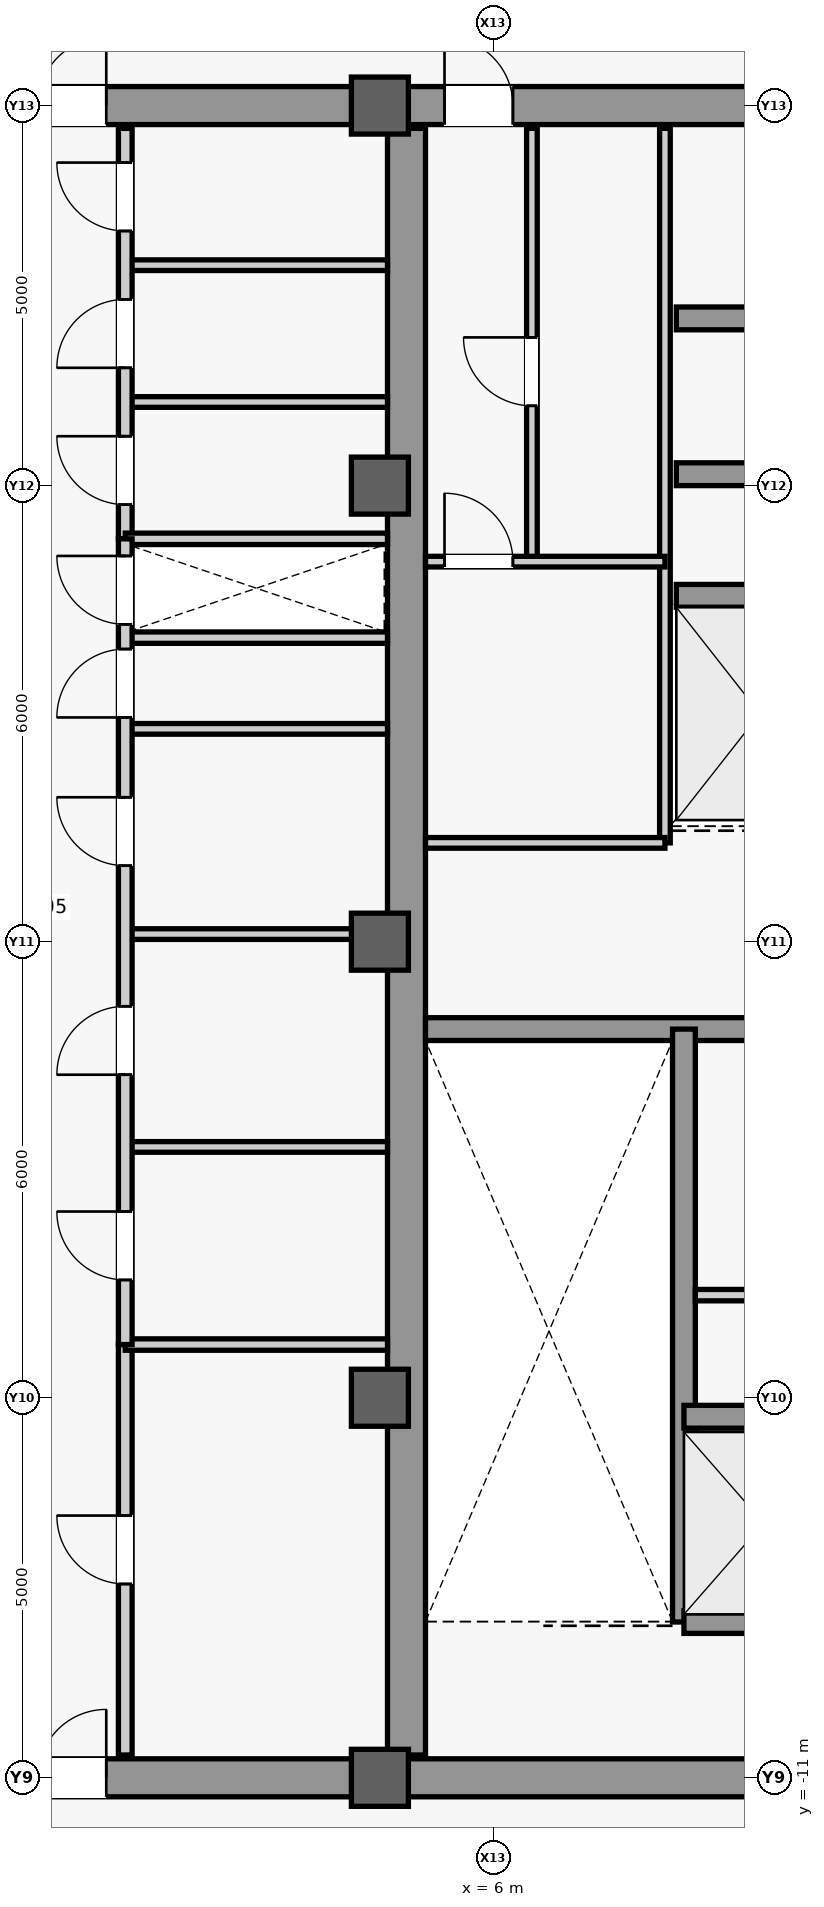
"""IFC4 building model, lengths in metres.
Left out: names, types, materials, properties, quantities, classifications, styles, units other than length and angle.
Written with IfcOpenShell. Run it as: python <this file> out.ifc"""

import sys

from ifc_helpers import new_model, si_unit, direction, frame, frame_2d, origin, origin_2d, place, context, subcontext, project, spatial, rectangle, extrude, source, transform, mapped, element, fill, save


model = new_model("IFC4")
c1 = context("Model", 3, precision=1e-05, world=origin(), true_north=direction((0.0, 1.0)))
c2 = subcontext(c1, "Body", "Model", "MODEL_VIEW")
j1 = project(units=[si_unit("LENGTHUNIT", "METRE"), si_unit("PLANEANGLEUNIT", "RADIAN")], contexts=[c1])
p1 = place(None, origin())
s1 = spatial("IfcSite", under=j1, at=p1, CompositionType="ELEMENT")
p2 = place(p1, origin())
s2 = spatial("IfcBuilding", under=s1, at=p2, CompositionType="ELEMENT")
p3 = place(p2, frame((0.0, 0.0, 399.5)))
s3 = spatial("IfcBuildingStorey", under=s2, at=p3, CompositionType="ELEMENT", Elevation=399.5)
m1 = source(origin(), c2, "Body", "SweptSolid", [
    extrude(rectangle(XDim=21.4, YDim=0.5, at=frame_2d((10.7, 0.0))), origin(), (0.0, 0.0, 1.0), 4.5),
])
p4 = place(p3, frame((4.85, -10.7, 0.0), z_axis=(0.0, 0.0, 1.0), x_axis=(0.0, 1.0, 0.0)))
e1 = element("IfcWall", 1, at=p4, inside=s3, PredefinedType="SHEAR", context=c2, shape_type="MappedRepresentation", body=[
    mapped(m1, transform((0.0, 0.0, 0.0), scale=1.0)),
])
m2 = source(origin(), c2, "Body", "SweptSolid", [
    extrude(rectangle(XDim=5.9, YDim=0.5, at=frame_2d((2.95, 0.0))), origin(), (0.0, 0.0, 1.0), 4.5),
])
p5 = place(p3, frame((4.85, -11.0, 0.0), z_axis=(0.0, 0.0, 1.0), x_axis=(1.0, 0.0, 0.0)))
e2 = element("IfcWall", 2, at=p5, inside=s3, PredefinedType="SHEAR", context=c2, shape_type="MappedRepresentation", body=[
    mapped(m2, transform((0.0, 0.0, 0.0), scale=1.0)),
])
p6 = place(p3, frame((4.85, 11.0, 0.0), z_axis=(0.0, 0.0, 1.0), x_axis=(1.0, 0.0, 0.0)))
e3 = element("IfcWall", 3, at=p6, inside=s3, PredefinedType="SHEAR", context=c2, shape_type="MappedRepresentation", body=[
    mapped(m2, transform((0.0, 0.0, 0.0), scale=1.0)),
])
m3 = source(origin(), c2, "Body", "SweptSolid", [
    extrude(rectangle(XDim=0.9, YDim=2.15, at=frame_2d((0.45, 1.075))), frame((0.0, 0.26, 0.0), z_axis=(0.0, -1.0, 0.0), x_axis=(1.0, 0.0, 0.0)), (0.0, 0.0, 1.0), 0.52),
])
p7 = place(p6, frame((0.5, 0.0, 0.0)))
e4 = element("IfcOpeningElement", 4, at=p7, cuts=e3, PredefinedType="OPENING", context=c2, shape_type="MappedRepresentation", body=[
    mapped(m3, transform((0.0, 0.0, 0.0), scale=1.0)),
])
m4 = source(origin(), c2, "Body", "SweptSolid", [
    extrude(rectangle(XDim=5.65, YDim=0.3, at=frame_2d((2.825, 0.0))), origin(), (0.0, 0.0, 1.0), 4.5),
])
p8 = place(p3, frame((5.1, -1.15, 0.0), z_axis=(0.0, 0.0, 1.0), x_axis=(1.0, 0.0, 0.0)))
e5 = element("IfcWall", 5, at=p8, inside=s3, PredefinedType="SHEAR", context=c2, shape_type="MappedRepresentation", body=[
    mapped(m4, transform((0.0, 0.0, 0.0), scale=1.0)),
])
m5 = source(origin(), c2, "Body", "SweptSolid", [
    extrude(rectangle(XDim=9.2, YDim=0.5, at=frame_2d((4.6, 0.0))), origin(), (0.0, 0.0, 1.0), 4.5),
])
p9 = place(p3, frame((-4.6, -11.0, 0.0), z_axis=(0.0, 0.0, 1.0), x_axis=(1.0, 0.0, 0.0)))
e6 = element("IfcWall", 6, at=p9, inside=s3, PredefinedType="SHEAR", context=c2, shape_type="MappedRepresentation", body=[
    mapped(m5, transform((0.0, 0.0, 0.0), scale=1.0)),
])
m6 = source(origin(), c2, "Body", "SweptSolid", [
    extrude(rectangle(XDim=1.8, YDim=2.25, at=frame_2d((0.9, 1.125))), frame((0.0, 0.26, 0.0), z_axis=(0.0, -1.0, 0.0), x_axis=(1.0, 0.0, 0.0)), (0.0, 0.0, 1.0), 0.52),
])
p10 = place(p9, frame((3.7, 0.0, 0.0)))
e7 = element("IfcOpeningElement", 7, at=p10, cuts=e6, PredefinedType="OPENING", context=c2, shape_type="MappedRepresentation", body=[
    mapped(m6, transform((0.0, 0.0, 0.0), scale=1.0)),
])
p11 = place(p3, frame((-4.6, 11.0, 0.0), z_axis=(0.0, 0.0, 1.0), x_axis=(1.0, 0.0, 0.0)))
e8 = element("IfcWall", 8, at=p11, inside=s3, PredefinedType="SHEAR", context=c2, shape_type="MappedRepresentation", body=[
    mapped(m5, transform((0.0, 0.0, 0.0), scale=1.0)),
])
p12 = place(p11, frame((3.7, 0.0, 0.0)))
e9 = element("IfcOpeningElement", 9, at=p12, cuts=e8, PredefinedType="OPENING", context=c2, shape_type="MappedRepresentation", body=[
    mapped(m6, transform((0.0, 0.0, 0.0), scale=1.0)),
])
m7 = source(origin(), c2, "Body", "SweptSolid", [
    extrude(rectangle(XDim=0.75, YDim=0.75, at=origin_2d()), origin(), (0.0, 0.0, 1.0), 4.8),
])
for number, where, z_axis, x_axis in (
    (10, (4.5, -11.0, 0.0), (0.0, 0.0, 1.0), (1.0, 0.0, 0.0)),
    (11, (4.5, -6.0, 0.0), (0.0, 0.0, 1.0), (1.0, 0.0, 0.0)),
    (12, (4.5, 0.0, 0.0), (0.0, 0.0, 1.0), (1.0, 0.0, 0.0)),
    (13, (4.5, 6.0, 0.0), (0.0, 0.0, 1.0), (1.0, 0.0, 0.0)),
    (14, (4.5, 11.0, 0.0), (0.0, 0.0, 1.0), (1.0, 0.0, 0.0)),
):
    element("IfcColumn", number, at=place(p3, frame(where, z_axis=z_axis, x_axis=x_axis)), inside=s3, PredefinedType="COLUMN", context=c2, shape_type="MappedRepresentation", body=[
        mapped(m7, transform((0.0, 0.0, 0.0), scale=1.0)),
    ])
m8 = source(origin(), c2, "Body", "SweptSolid", [
    extrude(rectangle(XDim=7.8, YDim=0.3, at=frame_2d((3.9, 0.0))), origin(), (0.0, 0.0, 1.0), 4.5),
])
p13 = place(p3, frame((8.5, -8.95, 0.0), z_axis=(0.0, 0.0, 1.0), x_axis=(0.0, 1.0, 0.0)))
e15 = element("IfcWall", 15, at=p13, inside=s3, PredefinedType="SHEAR", context=c2, shape_type="MappedRepresentation", body=[
    mapped(m8, transform((0.0, 0.0, 0.0), scale=1.0)),
])
m9 = source(origin(), c2, "Body", "SweptSolid", [
    extrude(rectangle(XDim=2.2, YDim=0.3, at=frame_2d((1.1, 0.0))), origin(), (0.0, 0.0, 1.0), 4.5),
])
for number, where, z_axis, x_axis in (
    (16, (8.5, -8.95, 0.0), (0.0, 0.0, 1.0), (1.0, 0.0, 0.0)),
    (17, (8.5, -6.25, 0.0), (0.0, 0.0, 1.0), (1.0, 0.0, 0.0)),
):
    element("IfcWall", number, at=place(p3, frame(where, z_axis=z_axis, x_axis=x_axis)), inside=s3, PredefinedType="SHEAR", context=c2, shape_type="MappedRepresentation", body=[
        mapped(m9, transform((0.0, 0.0, 0.0), scale=1.0)),
    ])
m10 = source(origin(), c2, "Body", "SweptSolid", [
    extrude(rectangle(XDim=2.3, YDim=0.3, at=frame_2d((1.15, 0.0))), origin(), (0.0, 0.0, 1.0), 4.5),
])
for number, where, z_axis, x_axis in (
    (18, (8.4, 4.55, 0.0), (0.0, 0.0, 1.0), (1.0, 0.0, 0.0)),
    (19, (8.4, 6.15, 0.0), (0.0, 0.0, 1.0), (1.0, 0.0, 0.0)),
    (20, (8.4, 8.2, 0.0), (0.0, 0.0, 1.0), (1.0, 0.0, 0.0)),
):
    element("IfcWall", number, at=place(p3, frame(where, z_axis=z_axis, x_axis=x_axis)), inside=s3, PredefinedType="SHEAR", context=c2, shape_type="MappedRepresentation", body=[
        mapped(m10, transform((0.0, 0.0, 0.0), scale=1.0)),
    ])
m11 = source(origin(), c2, "Body", "SweptSolid", [
    extrude(rectangle(XDim=2.05, YDim=0.15, at=frame_2d((1.025, 0.0))), origin(), (0.0, 0.0, 1.0), 4.5),
])
p14 = place(p3, frame((8.65, -4.65, 0.0), z_axis=(0.0, 0.0, 1.0), x_axis=(1.0, 0.0, 0.0)))
e21 = element("IfcWall", 21, at=p14, inside=s3, PredefinedType="PARTITIONING", context=c2, shape_type="MappedRepresentation", body=[
    mapped(m11, transform((0.0, 0.0, 0.0), scale=1.0)),
])
m12 = source(origin(), c2, "Body", "SweptSolid", [
    extrude(rectangle(XDim=9.4, YDim=0.14, at=frame_2d((4.7, 0.0))), origin(), (0.0, 0.0, 1.0), 4.5),
])
p15 = place(p3, frame((8.25, 1.3, 0.0), z_axis=(0.0, 0.0, 1.0), x_axis=(0.0, 1.0, 0.0)))
e22 = element("IfcWall", 22, at=p15, inside=s3, PredefinedType="PARTITIONING", context=c2, shape_type="MappedRepresentation", body=[
    mapped(m12, transform((0.0, 0.0, 0.0), scale=1.0)),
])
m13 = source(origin(), c2, "Body", "SweptSolid", [
    extrude(rectangle(XDim=3.15, YDim=0.14, at=frame_2d((1.575, 0.0))), origin(), (0.0, 0.0, 1.0), 4.5),
])
p16 = place(p3, frame((5.1, 1.3, 0.0), z_axis=(0.0, 0.0, 1.0), x_axis=(1.0, 0.0, 0.0)))
e23 = element("IfcWall", 23, at=p16, inside=s3, PredefinedType="PARTITIONING", context=c2, shape_type="MappedRepresentation", body=[
    mapped(m13, transform((0.0, 0.0, 0.0), scale=1.0)),
])
m14 = source(origin(), c2, "Body", "SweptSolid", [
    extrude(rectangle(XDim=5.7, YDim=0.14, at=frame_2d((2.85, 0.0))), origin(), (0.0, 0.0, 1.0), 4.5),
])
p17 = place(p3, frame((6.5, 5.0, 0.0), z_axis=(0.0, 0.0, 1.0), x_axis=(0.0, 1.0, 0.0)))
e24 = element("IfcWall", 24, at=p17, inside=s3, PredefinedType="PARTITIONING", context=c2, shape_type="MappedRepresentation", body=[
    mapped(m14, transform((0.0, 0.0, 0.0), scale=1.0)),
])
m15 = source(origin(), c2, "Body", "SweptSolid", [
    extrude(rectangle(XDim=0.9, YDim=2.15, at=frame_2d((0.45, 1.075))), frame((0.0, 0.08, 0.0), z_axis=(0.0, -1.0, 0.0), x_axis=(1.0, 0.0, 0.0)), (0.0, 0.0, 1.0), 0.16),
])
p18 = place(p17, frame((2.05, 0.0, 0.0)))
e25 = element("IfcOpeningElement", 25, at=p18, cuts=e24, PredefinedType="OPENING", context=c2, shape_type="MappedRepresentation", body=[
    mapped(m15, transform((0.0, 0.0, 0.0), scale=1.0)),
])
p19 = place(p3, frame((5.1, 5.0, 0.0), z_axis=(0.0, 0.0, 1.0), x_axis=(1.0, 0.0, 0.0)))
e26 = element("IfcWall", 26, at=p19, inside=s3, PredefinedType="PARTITIONING", context=c2, shape_type="MappedRepresentation", body=[
    mapped(m13, transform((0.0, 0.0, 0.0), scale=1.0)),
])
p20 = place(p19, frame((0.25, 0.0, 0.0)))
e27 = element("IfcOpeningElement", 27, at=p20, cuts=e26, PredefinedType="OPENING", context=c2, shape_type="MappedRepresentation", body=[
    mapped(m15, transform((0.0, 0.0, 0.0), scale=1.0)),
])
m16 = source(origin(), c2, "Body", "SweptSolid", [
    extrude(rectangle(XDim=3.45, YDim=0.15, at=frame_2d((1.725, 0.0))), origin(), (0.0, 0.0, 1.0), 4.5),
])
p21 = place(p3, frame((1.15, 4.0, 0.0), z_axis=(0.0, 0.0, 1.0), x_axis=(1.0, 0.0, 0.0)))
e28 = element("IfcWall", 28, at=p21, inside=s3, PredefinedType="PARTITIONING", context=c2, shape_type="MappedRepresentation", body=[
    mapped(m16, transform((0.0, 0.0, 0.0), scale=1.0)),
])
m17 = source(origin(), c2, "Body", "SweptSolid", [
    extrude(rectangle(XDim=5.4, YDim=0.18, at=frame_2d((2.7, 0.0))), origin(), (0.0, 0.0, 1.0), 4.5),
])
p22 = place(p3, frame((1.15, -10.7, 0.0), z_axis=(0.0, 0.0, 1.0), x_axis=(0.0, 1.0, 0.0)))
e29 = element("IfcWall", 29, at=p22, inside=s3, PredefinedType="PARTITIONING", context=c2, shape_type="MappedRepresentation", body=[
    mapped(m17, transform((0.0, 0.0, 0.0), scale=1.0)),
])
m18 = source(origin(), c2, "Body", "SweptSolid", [
    extrude(rectangle(XDim=0.9, YDim=2.15, at=frame_2d((0.45, 1.075))), frame((0.0, 0.1, 0.0), z_axis=(0.0, -1.0, 0.0), x_axis=(1.0, 0.0, 0.0)), (0.0, 0.0, 1.0), 0.2),
])
p23 = place(p22, frame((2.25, 0.0, 0.0)))
e30 = element("IfcOpeningElement", 30, at=p23, cuts=e29, PredefinedType="OPENING", context=c2, shape_type="MappedRepresentation", body=[
    mapped(m18, transform((0.0, 0.0, 0.0), scale=1.0)),
])
p24 = place(p3, frame((1.15, -5.3, 0.0), z_axis=(0.0, 0.0, 1.0), x_axis=(1.0, 0.0, 0.0)))
e31 = element("IfcWall", 31, at=p24, inside=s3, PredefinedType="PARTITIONING", context=c2, shape_type="MappedRepresentation", body=[
    mapped(m16, transform((0.0, 0.0, 0.0), scale=1.0)),
])
m19 = source(origin(), c2, "Body", "SweptSolid", [
    extrude(rectangle(XDim=3.45, YDim=0.14, at=frame_2d((1.725, 0.0))), origin(), (0.0, 0.0, 1.0), 4.5),
])
for number, where, z_axis, x_axis in (
    (32, (1.15, 7.1, 0.0), (0.0, 0.0, 1.0), (1.0, 0.0, 0.0)),
    (33, (1.15, 8.9, 0.0), (0.0, 0.0, 1.0), (1.0, 0.0, 0.0)),
):
    element("IfcWall", number, at=place(p3, frame(where, z_axis=z_axis, x_axis=x_axis)), inside=s3, PredefinedType="PARTITIONING", context=c2, shape_type="MappedRepresentation", body=[
        mapped(m19, transform((0.0, 0.0, 0.0), scale=1.0)),
    ])
p25 = place(p3, frame((1.15, 5.3, 0.0), z_axis=(0.0, 0.0, 1.0), x_axis=(0.0, 1.0, 0.0)))
e34 = element("IfcWall", 34, at=p25, inside=s3, PredefinedType="PARTITIONING", context=c2, shape_type="MappedRepresentation", body=[
    mapped(m17, transform((0.0, 0.0, 0.0), scale=1.0)),
])
p26 = place(p25, frame((0.45, 0.0, 0.0)))
e35 = element("IfcOpeningElement", 35, at=p26, cuts=e34, PredefinedType="OPENING", context=c2, shape_type="MappedRepresentation", body=[
    mapped(m18, transform((0.0, 0.0, 0.0), scale=1.0)),
])
p27 = place(p25, frame((2.25, 0.0, 0.0)))
e36 = element("IfcOpeningElement", 36, at=p27, cuts=e34, PredefinedType="OPENING", context=c2, shape_type="MappedRepresentation", body=[
    mapped(m18, transform((0.0, 0.0, 0.0), scale=1.0)),
])
p28 = place(p25, frame((4.05, 0.0, 0.0)))
e37 = element("IfcOpeningElement", 37, at=p28, cuts=e34, PredefinedType="OPENING", context=c2, shape_type="MappedRepresentation", body=[
    mapped(m18, transform((0.0, 0.0, 0.0), scale=1.0)),
])
p29 = place(p3, frame((1.15, 5.3, 0.0), z_axis=(0.0, 0.0, 1.0), x_axis=(1.0, 0.0, 0.0)))
e38 = element("IfcWall", 38, at=p29, inside=s3, PredefinedType="PARTITIONING", context=c2, shape_type="MappedRepresentation", body=[
    mapped(m16, transform((0.0, 0.0, 0.0), scale=1.0)),
])
p30 = place(p3, frame((1.15, -2.7, 0.0), z_axis=(0.0, 0.0, 1.0), x_axis=(1.0, 0.0, 0.0)))
e39 = element("IfcWall", 39, at=p30, inside=s3, PredefinedType="PARTITIONING", context=c2, shape_type="MappedRepresentation", body=[
    mapped(m19, transform((0.0, 0.0, 0.0), scale=1.0)),
])
m20 = source(origin(), c2, "Body", "SweptSolid", [
    extrude(rectangle(XDim=3.45, YDim=0.14, at=frame_2d((1.725, 0.0))), origin(), (0.0, 0.0, 1.0), 3.805),
])
p31 = place(p3, frame((1.15, 0.1, 0.0), z_axis=(0.0, 0.0, 1.0), x_axis=(1.0, 0.0, 0.0)))
e40 = element("IfcWall", 40, at=p31, inside=s3, PredefinedType="PARTITIONING", context=c2, shape_type="MappedRepresentation", body=[
    mapped(m20, transform((0.0, 0.0, 0.0), scale=1.0)),
])
p32 = place(p3, frame((1.15, 2.8, 0.0), z_axis=(0.0, 0.0, 1.0), x_axis=(1.0, 0.0, 0.0)))
e41 = element("IfcWall", 41, at=p32, inside=s3, PredefinedType="PARTITIONING", context=c2, shape_type="MappedRepresentation", body=[
    mapped(m19, transform((0.0, 0.0, 0.0), scale=1.0)),
])
m21 = source(origin(), c2, "Body", "SweptSolid", [
    extrude(rectangle(XDim=10.6, YDim=0.18, at=frame_2d((5.3, 0.0))), origin(), (0.0, 0.0, 1.0), 4.5),
])
p33 = place(p3, frame((1.15, -5.3, 0.0), z_axis=(0.0, 0.0, 1.0), x_axis=(0.0, 1.0, 0.0)))
e42 = element("IfcWall", 42, at=p33, inside=s3, PredefinedType="PARTITIONING", context=c2, shape_type="MappedRepresentation", body=[
    mapped(m21, transform((0.0, 0.0, 0.0), scale=1.0)),
])
p34 = place(p33, frame((0.85, 0.0, 0.0)))
e43 = element("IfcOpeningElement", 43, at=p34, cuts=e42, PredefinedType="OPENING", context=c2, shape_type="MappedRepresentation", body=[
    mapped(m18, transform((0.0, 0.0, 0.0), scale=1.0)),
])
p35 = place(p33, frame((3.55, 0.0, 0.0)))
e44 = element("IfcOpeningElement", 44, at=p35, cuts=e42, PredefinedType="OPENING", context=c2, shape_type="MappedRepresentation", body=[
    mapped(m18, transform((0.0, 0.0, 0.0), scale=1.0)),
])
p36 = place(p33, frame((6.3, 0.0, 0.0)))
e45 = element("IfcOpeningElement", 45, at=p36, cuts=e42, PredefinedType="OPENING", context=c2, shape_type="MappedRepresentation", body=[
    mapped(m18, transform((0.0, 0.0, 0.0), scale=1.0)),
])
p37 = place(p33, frame((8.25, 0.0, 0.0)))
e46 = element("IfcOpeningElement", 46, at=p37, cuts=e42, PredefinedType="OPENING", context=c2, shape_type="MappedRepresentation", body=[
    mapped(m18, transform((0.0, 0.0, 0.0), scale=1.0)),
])
p38 = place(p33, frame((9.475, 0.0, 0.0)))
e47 = element("IfcOpeningElement", 47, at=p38, cuts=e42, PredefinedType="OPENING", context=c2, shape_type="MappedRepresentation", body=[
    mapped(m18, transform((0.0, 0.0, 0.0), scale=1.0)),
])
m22 = source(origin(), c2, "Body", "SweptSolid", [
    extrude(rectangle(XDim=0.9, YDim=2.15, at=frame_2d((0.45, 1.075))), frame((0.0, 0.025, 0.0), z_axis=(0.0, -1.0, 0.0), x_axis=(1.0, 0.0, 0.0)), (0.0, 0.0, 1.0), 0.05),
])
p39 = place(p7, origin())
e48 = element("IfcDoor", 48, at=p39, inside=s3, OperationType="SINGLE_SWING_LEFT", PredefinedType="DOOR", context=c2, shape_type="MappedRepresentation", body=[
    mapped(m22, transform((0.0, 0.0, 0.0), scale=1.0)),
])
fill(e4, e48)
p40 = place(p18, origin())
e49 = element("IfcDoor", 49, at=p40, inside=s3, OperationType="SINGLE_SWING_RIGHT", PredefinedType="DOOR", context=c2, shape_type="MappedRepresentation", body=[
    mapped(m22, transform((0.0, 0.0, 0.0), scale=1.0)),
])
fill(e25, e49)
p41 = place(p20, origin())
e50 = element("IfcDoor", 50, at=p41, inside=s3, OperationType="SINGLE_SWING_LEFT", PredefinedType="DOOR", context=c2, shape_type="MappedRepresentation", body=[
    mapped(m22, transform((0.0, 0.0, 0.0), scale=1.0)),
])
fill(e27, e50)
p42 = place(p23, origin())
e51 = element("IfcDoor", 51, at=p42, inside=s3, OperationType="SINGLE_SWING_RIGHT", PredefinedType="DOOR", context=c2, shape_type="MappedRepresentation", body=[
    mapped(m22, transform((0.0, 0.0, 0.0), scale=1.0)),
])
fill(e30, e51)
m23 = source(origin(), c2, "Body", "SweptSolid", [
    extrude(rectangle(XDim=1.8, YDim=2.25, at=frame_2d((0.9, 1.125))), frame((0.0, 0.025, 0.0), z_axis=(0.0, -1.0, 0.0), x_axis=(1.0, 0.0, 0.0)), (0.0, 0.0, 1.0), 0.05),
])
p43 = place(p10, origin())
e52 = element("IfcDoor", 52, at=p43, inside=s3, OperationType="SINGLE_SWING_LEFT", PredefinedType="DOOR", context=c2, shape_type="MappedRepresentation", body=[
    mapped(m23, transform((0.0, 0.0, 0.0), scale=1.0)),
])
fill(e7, e52)
p44 = place(p26, origin())
e53 = element("IfcDoor", 53, at=p44, inside=s3, OperationType="SINGLE_SWING_RIGHT", PredefinedType="DOOR", context=c2, shape_type="MappedRepresentation", body=[
    mapped(m22, transform((0.0, 0.0, 0.0), scale=1.0)),
])
fill(e35, e53)
p45 = place(p27, origin())
e54 = element("IfcDoor", 54, at=p45, inside=s3, OperationType="SINGLE_SWING_LEFT", PredefinedType="DOOR", context=c2, shape_type="MappedRepresentation", body=[
    mapped(m22, transform((0.0, 0.0, 0.0), scale=1.0)),
])
fill(e36, e54)
p46 = place(p28, origin())
e55 = element("IfcDoor", 55, at=p46, inside=s3, OperationType="SINGLE_SWING_RIGHT", PredefinedType="DOOR", context=c2, shape_type="MappedRepresentation", body=[
    mapped(m22, transform((0.0, 0.0, 0.0), scale=1.0)),
])
fill(e37, e55)
p47 = place(p12, origin())
e56 = element("IfcDoor", 56, at=p47, inside=s3, OperationType="SINGLE_SWING_RIGHT", PredefinedType="DOOR", context=c2, shape_type="MappedRepresentation", body=[
    mapped(m23, transform((0.0, 0.0, 0.0), scale=1.0)),
])
fill(e9, e56)
p48 = place(p34, origin())
e57 = element("IfcDoor", 57, at=p48, inside=s3, OperationType="SINGLE_SWING_RIGHT", PredefinedType="DOOR", context=c2, shape_type="MappedRepresentation", body=[
    mapped(m22, transform((0.0, 0.0, 0.0), scale=1.0)),
])
fill(e43, e57)
p49 = place(p35, origin())
e58 = element("IfcDoor", 58, at=p49, inside=s3, OperationType="SINGLE_SWING_LEFT", PredefinedType="DOOR", context=c2, shape_type="MappedRepresentation", body=[
    mapped(m22, transform((0.0, 0.0, 0.0), scale=1.0)),
])
fill(e44, e58)
p50 = place(p36, origin())
e59 = element("IfcDoor", 59, at=p50, inside=s3, OperationType="SINGLE_SWING_RIGHT", PredefinedType="DOOR", context=c2, shape_type="MappedRepresentation", body=[
    mapped(m22, transform((0.0, 0.0, 0.0), scale=1.0)),
])
fill(e45, e59)
p51 = place(p37, origin())
e60 = element("IfcDoor", 60, at=p51, inside=s3, OperationType="SINGLE_SWING_LEFT", PredefinedType="DOOR", context=c2, shape_type="MappedRepresentation", body=[
    mapped(m22, transform((0.0, 0.0, 0.0), scale=1.0)),
])
fill(e46, e60)
p52 = place(p38, origin())
e61 = element("IfcDoor", 61, at=p52, inside=s3, OperationType="SINGLE_SWING_RIGHT", PredefinedType="DOOR", context=c2, shape_type="MappedRepresentation", body=[
    mapped(m22, transform((0.0, 0.0, 0.0), scale=1.0)),
])
fill(e47, e61)
save(model, sys.argv[1])
